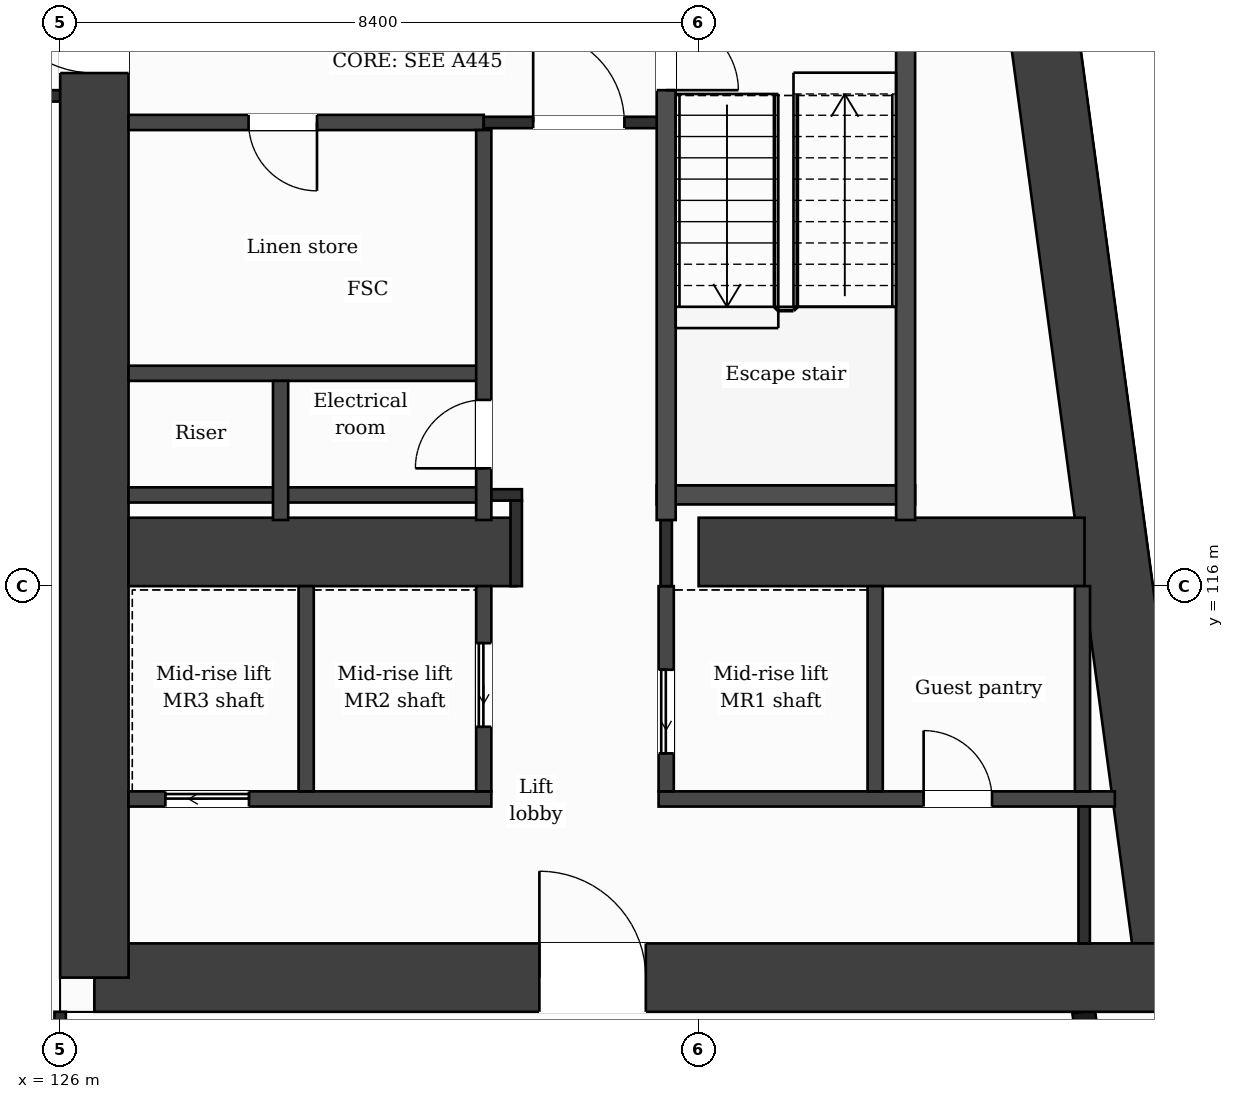
"""IFC4 building model, lengths in metres.
Left out: names, types, materials, properties, quantities, classifications, styles, units other than length and angle.
Written with IfcOpenShell. Run it as: python <this file> out.ifc"""

import sys

from ifc_helpers import new_model, si_unit, direction, frame, frame_2d, origin, place, context, subcontext, project, spatial, rectangle, extrude, element, fill, save


model = new_model("IFC4")
c1 = context("Model", 3, precision=1e-05, world=origin(), true_north=direction((0.0, 1.0)))
c2 = subcontext(c1, "Body", "Model", "MODEL_VIEW")
j1 = project(units=[si_unit("LENGTHUNIT", "METRE"), si_unit("PLANEANGLEUNIT", "RADIAN")], contexts=[c1])
p1 = place(None, origin())
s1 = spatial("IfcSite", under=j1, at=p1, CompositionType="ELEMENT")
p2 = place(p1, origin())
s2 = spatial("IfcBuilding", under=s1, at=p2, CompositionType="ELEMENT")
p3 = place(p2, frame((0.0, 0.0, 184.8)))
s3 = spatial("IfcBuildingStorey", under=s2, at=p3, CompositionType="ELEMENT", Elevation=184.8)
p4 = place(p3, frame((137.776, 131.95, 0.0), z_axis=(0.0, 0.0, 1.0), x_axis=(0.133421759112, -0.991059349482, 0.0)))
e1 = element("IfcWall", 1, at=p4, inside=s3, PredefinedType="SHEAR", context=c2, shape_type="SweptSolid", body=[
    extrude(rectangle(XDim=21.29, YDim=0.9, at=frame_2d((10.645, 0.0))), origin(), (0.0, 0.0, 1.0), 3.7),
])
p5 = place(p3, frame((140.616, 110.85, 0.0), z_axis=(0.0, 0.0, 1.0), x_axis=(-1.0, 0.0, 0.0)))
e2 = element("IfcWall", 2, at=p5, inside=s3, PredefinedType="SHEAR", context=c2, shape_type="SweptSolid", body=[
    extrude(rectangle(XDim=14.166, YDim=0.9, at=frame_2d((7.083, 0.0))), origin(), (0.0, 0.0, 1.0), 3.7),
])
p6 = place(p5, frame((6.911, 0.0, 0.0)))
e3 = element("IfcOpeningElement", 3, at=p6, cuts=e2, PredefinedType="OPENING", context=c2, shape_type="SweptSolid", body=[
    extrude(rectangle(XDim=1.4, YDim=2.1, at=frame_2d((0.7, 1.05))), frame((0.0, 0.46, 0.0), z_axis=(0.0, -1.0, 0.0), x_axis=(1.0, 0.0, 0.0)), (0.0, 0.0, 1.0), 0.92),
])
p7 = place(p3, frame((126.45, 110.85, 0.0), z_axis=(0.0, 0.0, 1.0), x_axis=(0.0, 1.0, 0.0)))
e4 = element("IfcWall", 4, at=p7, inside=s3, PredefinedType="SHEAR", context=c2, shape_type="SweptSolid", body=[
    extrude(rectangle(XDim=21.1, YDim=0.9, at=frame_2d((10.55, 0.0))), origin(), (0.0, 0.0, 1.0), 3.7),
])
p8 = place(p7, frame((11.9, 0.0, 0.0)))
e5 = element("IfcOpeningElement", 5, at=p8, cuts=e4, PredefinedType="OPENING", context=c2, shape_type="SweptSolid", body=[
    extrude(rectangle(XDim=1.4, YDim=2.1, at=frame_2d((0.7, 1.05))), frame((0.0, 0.46, 0.0), z_axis=(0.0, -1.0, 0.0), x_axis=(1.0, 0.0, 0.0)), (0.0, 0.0, 1.0), 0.92),
])
p9 = place(p3, frame((126.9, 116.45, 0.0), z_axis=(0.0, 0.0, 1.0), x_axis=(1.0, 0.0, 0.0)))
e6 = element("IfcWall", 6, at=p9, inside=s3, PredefinedType="SHEAR", context=c2, shape_type="SweptSolid", body=[
    extrude(rectangle(XDim=5.1, YDim=0.9, at=frame_2d((2.55, 0.0))), origin(), (0.0, 0.0, 1.0), 3.7),
])
p10 = place(p3, frame((134.4, 116.45, 0.0), z_axis=(0.0, 0.0, 1.0), x_axis=(1.0, 0.0, 0.0)))
e7 = element("IfcWall", 7, at=p10, inside=s3, PredefinedType="SHEAR", context=c2, shape_type="SweptSolid", body=[
    extrude(rectangle(XDim=5.077, YDim=0.9, at=frame_2d((2.539, 0.0))), origin(), (0.0, 0.0, 1.0), 3.7),
])
p11 = place(p3, frame((140.348, 103.85, 0.0), z_axis=(0.0, 0.0, 1.0), x_axis=(-0.133431549479, 0.991058031401, 0.0)))
e8 = element("IfcWall", 8, at=p11, inside=s3, PredefinedType="SOLIDWALL", context=c2, shape_type="SweptSolid", body=[
    extrude(rectangle(XDim=6.609, YDim=0.3, at=frame_2d((3.304, 0.0))), origin(), (0.0, 0.0, 1.0), 3.38),
])
p12 = place(p11, frame((0.737, 0.0, 0.9)))
e9 = element("IfcOpeningElement", 9, at=p12, cuts=e8, PredefinedType="OPENING", context=c2, shape_type="SweptSolid", body=[
    extrude(rectangle(XDim=1.2, YDim=2.1, at=frame_2d((0.6, 1.05))), frame((0.0, 0.16, 0.0), z_axis=(0.0, -1.0, 0.0), x_axis=(1.0, 0.0, 0.0)), (0.0, 0.0, 1.0), 0.32),
])
p13 = place(p11, frame((3.991, 0.0, 0.0)))
e10 = element("IfcOpeningElement", 10, at=p13, cuts=e8, PredefinedType="OPENING", context=c2, shape_type="SweptSolid", body=[
    extrude(rectangle(XDim=1.2, YDim=2.4, at=frame_2d((0.6, 1.2))), frame((0.0, 0.16, 0.0), z_axis=(0.0, -1.0, 0.0), x_axis=(1.0, 0.0, 0.0)), (0.0, 0.0, 1.0), 0.32),
])
p14 = place(p3, frame((126.9, 113.2, 0.0), z_axis=(0.0, 0.0, 1.0), x_axis=(1.0, 0.0, 0.0)))
e11 = element("IfcWall", 11, at=p14, inside=s3, PredefinedType="PARTITIONING", context=c2, shape_type="SweptSolid", body=[
    extrude(rectangle(XDim=4.773, YDim=0.2, at=frame_2d((2.387, 0.0))), origin(), (0.0, 0.0, 1.0), 3.38),
])
p15 = place(p14, frame((0.484, 0.0, 0.0)))
e12 = element("IfcOpeningElement", 12, at=p15, cuts=e11, PredefinedType="OPENING", context=c2, shape_type="SweptSolid", body=[
    extrude(rectangle(XDim=1.1, YDim=2.1, at=frame_2d((0.55, 1.05))), frame((0.0, 0.11, 0.0), z_axis=(0.0, -1.0, 0.0), x_axis=(1.0, 0.0, 0.0)), (0.0, 0.0, 1.0), 0.22),
])
p16 = place(p3, frame((133.873, 113.2, 0.0), z_axis=(0.0, 0.0, 1.0), x_axis=(1.0, 0.0, 0.0)))
e13 = element("IfcWall", 13, at=p16, inside=s3, PredefinedType="PARTITIONING", context=c2, shape_type="SweptSolid", body=[
    extrude(rectangle(XDim=6.003, YDim=0.2, at=frame_2d((3.001, 0.0))), origin(), (0.0, 0.0, 1.0), 3.38),
])
p17 = place(p16, frame((3.487, 0.0, 0.0)))
e14 = element("IfcOpeningElement", 14, at=p17, cuts=e13, PredefinedType="OPENING", context=c2, shape_type="SweptSolid", body=[
    extrude(rectangle(XDim=0.9, YDim=2.1, at=frame_2d((0.45, 1.05))), frame((0.0, 0.11, 0.0), z_axis=(0.0, -1.0, 0.0), x_axis=(1.0, 0.0, 0.0)), (0.0, 0.0, 1.0), 0.22),
])
p18 = place(p3, frame((126.9, 117.2, 0.0), z_axis=(0.0, 0.0, 1.0), x_axis=(1.0, 0.0, 0.0)))
e15 = element("IfcWall", 15, at=p18, inside=s3, PredefinedType="PARTITIONING", context=c2, shape_type="SweptSolid", body=[
    extrude(rectangle(XDim=4.673, YDim=0.2, at=frame_2d((2.336, 0.0))), origin(), (0.0, 0.0, 1.0), 3.38),
])
p19 = place(p3, frame((131.573, 117.2, 0.0), z_axis=(0.0, 0.0, 1.0), x_axis=(1.0, 0.0, 0.0)))
e16 = element("IfcWall", 16, at=p19, inside=s3, PredefinedType="PARTITIONING", context=c2, shape_type="SweptSolid", body=[
    extrude(rectangle(XDim=0.502, YDim=0.15, at=frame_2d((0.251, 0.0))), origin(), (0.0, 0.0, 1.0), 3.38),
])
p20 = place(p3, frame((133.848, 117.2, 0.0), z_axis=(0.0, 0.0, 1.0), x_axis=(1.0, 0.0, 0.0)))
e17 = element("IfcWall", 17, at=p20, inside=s3, PredefinedType="PARTITIONING", context=c2, shape_type="SweptSolid", body=[
    extrude(rectangle(XDim=3.4, YDim=0.25, at=frame_2d((1.7, 0.0))), origin(), (0.0, 0.0, 1.0), 3.38),
])
p21 = place(p3, frame((126.9, 118.8, 0.0), z_axis=(0.0, 0.0, 1.0), x_axis=(1.0, 0.0, 0.0)))
e18 = element("IfcWall", 18, at=p21, inside=s3, PredefinedType="PARTITIONING", context=c2, shape_type="SweptSolid", body=[
    extrude(rectangle(XDim=4.673, YDim=0.2, at=frame_2d((2.336, 0.0))), origin(), (0.0, 0.0, 1.0), 3.38),
])
p22 = place(p3, frame((126.9, 122.1, 0.0), z_axis=(0.0, 0.0, 1.0), x_axis=(1.0, 0.0, 0.0)))
e19 = element("IfcWall", 19, at=p22, inside=s3, PredefinedType="PARTITIONING", context=c2, shape_type="SweptSolid", body=[
    extrude(rectangle(XDim=4.673, YDim=0.2, at=frame_2d((2.336, 0.0))), origin(), (0.0, 0.0, 1.0), 3.38),
])
p23 = place(p22, frame((1.579, 0.0, 0.0)))
e20 = element("IfcOpeningElement", 20, at=p23, cuts=e19, PredefinedType="OPENING", context=c2, shape_type="SweptSolid", body=[
    extrude(rectangle(XDim=0.9, YDim=2.1, at=frame_2d((0.45, 1.05))), frame((0.0, 0.11, 0.0), z_axis=(0.0, -1.0, 0.0), x_axis=(1.0, 0.0, 0.0)), (0.0, 0.0, 1.0), 0.22),
])
p24 = place(p3, frame((131.573, 122.1, 0.0), z_axis=(0.0, 0.0, 1.0), x_axis=(1.0, 0.0, 0.0)))
e21 = element("IfcWall", 21, at=p24, inside=s3, PredefinedType="PARTITIONING", context=c2, shape_type="SweptSolid", body=[
    extrude(rectangle(XDim=2.4, YDim=0.15, at=frame_2d((1.2, 0.0))), origin(), (0.0, 0.0, 1.0), 3.38),
])
p25 = place(p24, frame((0.65, 0.0, 0.0)))
e22 = element("IfcOpeningElement", 22, at=p25, cuts=e21, PredefinedType="OPENING", context=c2, shape_type="SweptSolid", body=[
    extrude(rectangle(XDim=1.2, YDim=2.1, at=frame_2d((0.6, 1.05))), frame((0.0, 0.085, 0.0), z_axis=(0.0, -1.0, 0.0), x_axis=(1.0, 0.0, 0.0)), (0.0, 0.0, 1.0), 0.17),
])
p26 = place(p3, frame((100.8, 122.45, 0.0), z_axis=(0.0, 0.0, 1.0), x_axis=(1.0, 0.0, 0.0)))
e23 = element("IfcWall", 23, at=p26, inside=s3, PredefinedType="PARTITIONING", context=c2, shape_type="SweptSolid", body=[
    extrude(rectangle(XDim=25.2, YDim=0.15, at=frame_2d((12.6, 0.0))), origin(), (0.0, 0.0, 1.0), 3.38),
])
p27 = place(p3, frame((126.0, 109.075, 0.0), z_axis=(0.0, 0.0, 1.0), x_axis=(0.0, 1.0, 0.0)))
e24 = element("IfcWall", 24, at=p27, inside=s3, PredefinedType="PARTITIONING", context=c2, shape_type="SweptSolid", body=[
    extrude(rectangle(XDim=1.325, YDim=0.15, at=frame_2d((0.663, 0.0))), origin(), (0.0, 0.0, 1.0), 3.38),
])
p28 = place(p3, frame((128.9, 116.87, 0.0), z_axis=(0.0, 0.0, 1.0), x_axis=(0.0, 1.0, 0.0)))
e25 = element("IfcWall", 25, at=p28, inside=s3, PredefinedType="PARTITIONING", context=c2, shape_type="SweptSolid", body=[
    extrude(rectangle(XDim=1.83, YDim=0.2, at=frame_2d((0.915, 0.0))), origin(), (0.0, 0.0, 1.0), 3.38),
])
p29 = place(p3, frame((129.237, 113.3, 0.0), z_axis=(0.0, 0.0, 1.0), x_axis=(0.0, 1.0, 0.0)))
e26 = element("IfcWall", 26, at=p29, inside=s3, PredefinedType="PARTITIONING", context=c2, shape_type="SweptSolid", body=[
    extrude(rectangle(XDim=2.7, YDim=0.2, at=frame_2d((1.35, 0.0))), origin(), (0.0, 0.0, 1.0), 3.38),
])
p30 = place(p3, frame((131.573, 113.3, 0.0), z_axis=(0.0, 0.0, 1.0), x_axis=(0.0, 1.0, 0.0)))
e27 = element("IfcWall", 27, at=p30, inside=s3, PredefinedType="PARTITIONING", context=c2, shape_type="SweptSolid", body=[
    extrude(rectangle(XDim=2.7, YDim=0.2, at=frame_2d((1.35, 0.0))), origin(), (0.0, 0.0, 1.0), 3.38),
])
p31 = place(p30, frame((0.85, 0.0, 0.0)))
e28 = element("IfcOpeningElement", 28, at=p31, cuts=e27, PredefinedType="OPENING", context=c2, shape_type="SweptSolid", body=[
    extrude(rectangle(XDim=1.1, YDim=2.1, at=frame_2d((0.55, 1.05))), frame((0.0, 0.11, 0.0), z_axis=(0.0, -1.0, 0.0), x_axis=(1.0, 0.0, 0.0)), (0.0, 0.0, 1.0), 0.22),
])
p32 = place(p3, frame((131.573, 116.87, 0.0), z_axis=(0.0, 0.0, 1.0), x_axis=(0.0, 1.0, 0.0)))
e29 = element("IfcWall", 29, at=p32, inside=s3, PredefinedType="PARTITIONING", context=c2, shape_type="SweptSolid", body=[
    extrude(rectangle(XDim=5.13, YDim=0.2, at=frame_2d((2.565, 0.0))), origin(), (0.0, 0.0, 1.0), 3.38),
])
p33 = place(p32, frame((0.68, 0.0, 0.0)))
e30 = element("IfcOpeningElement", 30, at=p33, cuts=e29, PredefinedType="OPENING", context=c2, shape_type="SweptSolid", body=[
    extrude(rectangle(XDim=0.9, YDim=2.1, at=frame_2d((0.45, 1.05))), frame((0.0, 0.11, 0.0), z_axis=(0.0, -1.0, 0.0), x_axis=(1.0, 0.0, 0.0)), (0.0, 0.0, 1.0), 0.22),
])
p34 = place(p3, frame((132.0, 116.0, 0.0), z_axis=(0.0, 0.0, 1.0), x_axis=(0.0, 1.0, 0.0)))
e31 = element("IfcWall", 31, at=p34, inside=s3, PredefinedType="PARTITIONING", context=c2, shape_type="SweptSolid", body=[
    extrude(rectangle(XDim=1.125, YDim=0.15, at=frame_2d((0.562, 0.0))), origin(), (0.0, 0.0, 1.0), 3.38),
])
p35 = place(p3, frame((133.973, 113.3, 0.0), z_axis=(0.0, 0.0, 1.0), x_axis=(0.0, 1.0, 0.0)))
e32 = element("IfcWall", 32, at=p35, inside=s3, PredefinedType="PARTITIONING", context=c2, shape_type="SweptSolid", body=[
    extrude(rectangle(XDim=2.7, YDim=0.2, at=frame_2d((1.35, 0.0))), origin(), (0.0, 0.0, 1.0), 3.38),
])
p36 = place(p35, frame((0.5, 0.0, 0.0)))
e33 = element("IfcOpeningElement", 33, at=p36, cuts=e32, PredefinedType="OPENING", context=c2, shape_type="SweptSolid", body=[
    extrude(rectangle(XDim=1.1, YDim=2.1, at=frame_2d((0.55, 1.05))), frame((0.0, 0.11, 0.0), z_axis=(0.0, -1.0, 0.0), x_axis=(1.0, 0.0, 0.0)), (0.0, 0.0, 1.0), 0.22),
])
p37 = place(p3, frame((133.973, 116.0, 0.0), z_axis=(0.0, 0.0, 1.0), x_axis=(0.0, 1.0, 0.0)))
e34 = element("IfcWall", 34, at=p37, inside=s3, PredefinedType="PARTITIONING", context=c2, shape_type="SweptSolid", body=[
    extrude(rectangle(XDim=0.87, YDim=0.15, at=frame_2d((0.435, 0.0))), origin(), (0.0, 0.0, 1.0), 3.38),
])
p38 = place(p3, frame((133.973, 116.87, 0.0), z_axis=(0.0, 0.0, 1.0), x_axis=(0.0, 1.0, 0.0)))
e35 = element("IfcWall", 35, at=p38, inside=s3, PredefinedType="PARTITIONING", context=c2, shape_type="SweptSolid", body=[
    extrude(rectangle(XDim=6.955, YDim=0.25, at=frame_2d((3.478, 0.0))), origin(), (0.0, 0.0, 1.0), 3.38),
])
p39 = place(p38, frame((5.655, 0.0, 0.0)))
e36 = element("IfcOpeningElement", 36, at=p39, cuts=e35, PredefinedType="OPENING", context=c2, shape_type="SweptSolid", body=[
    extrude(rectangle(XDim=0.95, YDim=2.1, at=frame_2d((0.475, 1.05))), frame((0.0, 0.135, 0.0), z_axis=(0.0, -1.0, 0.0), x_axis=(1.0, 0.0, 0.0)), (0.0, 0.0, 1.0), 0.27),
])
p40 = place(p3, frame((136.722, 113.3, 0.0), z_axis=(0.0, 0.0, 1.0), x_axis=(0.0, 1.0, 0.0)))
e37 = element("IfcWall", 37, at=p40, inside=s3, PredefinedType="PARTITIONING", context=c2, shape_type="SweptSolid", body=[
    extrude(rectangle(XDim=2.7, YDim=0.2, at=frame_2d((1.35, 0.0))), origin(), (0.0, 0.0, 1.0), 3.38),
])
p41 = place(p3, frame((137.123, 116.87, 0.0), z_axis=(0.0, 0.0, 1.0), x_axis=(0.0, 1.0, 0.0)))
e38 = element("IfcWall", 38, at=p41, inside=s3, PredefinedType="PARTITIONING", context=c2, shape_type="SweptSolid", body=[
    extrude(rectangle(XDim=6.955, YDim=0.25, at=frame_2d((3.478, 0.0))), origin(), (0.0, 0.0, 1.0), 3.38),
])
p42 = place(p3, frame((139.45, 113.3, 0.0), z_axis=(0.0, 0.0, 1.0), x_axis=(0.0, 1.0, 0.0)))
e39 = element("IfcWall", 39, at=p42, inside=s3, PredefinedType="PARTITIONING", context=c2, shape_type="SweptSolid", body=[
    extrude(rectangle(XDim=2.7, YDim=0.2, at=frame_2d((1.35, 0.0))), origin(), (0.0, 0.0, 1.0), 3.38),
])
p43 = place(p3, frame((139.472, 111.3, 0.0), z_axis=(0.0, 0.0, 1.0), x_axis=(0.0, 1.0, 0.0)))
e40 = element("IfcWall", 40, at=p43, inside=s3, PredefinedType="PARTITIONING", context=c2, shape_type="SweptSolid", body=[
    extrude(rectangle(XDim=1.8, YDim=0.15, at=frame_2d((0.9, 0.0))), origin(), (0.0, 0.0, 1.0), 3.38),
])
p44 = place(p25, origin())
e41 = element("IfcDoor", 41, at=p44, inside=s3, OperationType="SINGLE_SWING_LEFT", PredefinedType="DOOR", context=c2, shape_type="SweptSolid", body=[
    extrude(rectangle(XDim=1.2, YDim=2.1, at=frame_2d((0.6, 1.05))), frame((0.0, 0.025, 0.0), z_axis=(0.0, -1.0, 0.0), x_axis=(1.0, 0.0, 0.0)), (0.0, 0.0, 1.0), 0.05),
])
fill(e22, e41)
p45 = place(p23, origin())
e42 = element("IfcDoor", 42, at=p45, inside=s3, OperationType="SINGLE_SWING_RIGHT", PredefinedType="DOOR", context=c2, shape_type="SweptSolid", body=[
    extrude(rectangle(XDim=0.9, YDim=2.1, at=frame_2d((0.45, 1.05))), frame((0.0, 0.025, 0.0), z_axis=(0.0, -1.0, 0.0), x_axis=(1.0, 0.0, 0.0)), (0.0, 0.0, 1.0), 0.05),
])
fill(e20, e42)
p46 = place(p39, origin())
e43 = element("IfcDoor", 43, at=p46, inside=s3, OperationType="SINGLE_SWING_LEFT", PredefinedType="DOOR", context=c2, shape_type="SweptSolid", body=[
    extrude(rectangle(XDim=0.95, YDim=2.1, at=frame_2d((0.475, 1.05))), frame((0.0, 0.025, 0.0), z_axis=(0.0, -1.0, 0.0), x_axis=(1.0, 0.0, 0.0)), (0.0, 0.0, 1.0), 0.05),
])
fill(e36, e43)
p47 = place(p33, origin())
e44 = element("IfcDoor", 44, at=p47, inside=s3, OperationType="SINGLE_SWING_LEFT", PredefinedType="DOOR", context=c2, shape_type="SweptSolid", body=[
    extrude(rectangle(XDim=0.9, YDim=2.1, at=frame_2d((0.45, 1.05))), frame((0.0, 0.025, 0.0), z_axis=(0.0, -1.0, 0.0), x_axis=(1.0, 0.0, 0.0)), (0.0, 0.0, 1.0), 0.05),
])
fill(e30, e44)
p48 = place(p36, origin())
e45 = element("IfcDoor", 45, at=p48, inside=s3, OperationType="SLIDING_TO_LEFT", PredefinedType="DOOR", context=c2, shape_type="SweptSolid", body=[
    extrude(rectangle(XDim=1.1, YDim=2.1, at=frame_2d((0.55, 1.05))), frame((0.0, 0.025, 0.0), z_axis=(0.0, -1.0, 0.0), x_axis=(1.0, 0.0, 0.0)), (0.0, 0.0, 1.0), 0.05),
])
fill(e33, e45)
p49 = place(p31, origin())
e46 = element("IfcDoor", 46, at=p49, inside=s3, OperationType="SLIDING_TO_LEFT", PredefinedType="DOOR", context=c2, shape_type="SweptSolid", body=[
    extrude(rectangle(XDim=1.1, YDim=2.1, at=frame_2d((0.55, 1.05))), frame((0.0, 0.025, 0.0), z_axis=(0.0, -1.0, 0.0), x_axis=(1.0, 0.0, 0.0)), (0.0, 0.0, 1.0), 0.05),
])
fill(e28, e46)
p50 = place(p15, origin())
e47 = element("IfcDoor", 47, at=p50, inside=s3, OperationType="SLIDING_TO_LEFT", PredefinedType="DOOR", context=c2, shape_type="SweptSolid", body=[
    extrude(rectangle(XDim=1.1, YDim=2.1, at=frame_2d((0.55, 1.05))), frame((0.0, 0.025, 0.0), z_axis=(0.0, -1.0, 0.0), x_axis=(1.0, 0.0, 0.0)), (0.0, 0.0, 1.0), 0.05),
])
fill(e12, e47)
p51 = place(p17, origin())
e48 = element("IfcDoor", 48, at=p51, inside=s3, OperationType="SINGLE_SWING_LEFT", PredefinedType="DOOR", context=c2, shape_type="SweptSolid", body=[
    extrude(rectangle(XDim=0.9, YDim=2.1, at=frame_2d((0.45, 1.05))), frame((0.0, 0.025, 0.0), z_axis=(0.0, -1.0, 0.0), x_axis=(1.0, 0.0, 0.0)), (0.0, 0.0, 1.0), 0.05),
])
fill(e14, e48)
p52 = place(p6, origin())
e49 = element("IfcDoor", 49, at=p52, inside=s3, OperationType="SINGLE_SWING_RIGHT", PredefinedType="DOOR", context=c2, shape_type="SweptSolid", body=[
    extrude(rectangle(XDim=1.4, YDim=2.1, at=frame_2d((0.7, 1.05))), frame((0.0, 0.025, 0.0), z_axis=(0.0, -1.0, 0.0), x_axis=(1.0, 0.0, 0.0)), (0.0, 0.0, 1.0), 0.05),
])
fill(e3, e49)
p53 = place(p8, origin())
e50 = element("IfcDoor", 50, at=p53, inside=s3, OperationType="SINGLE_SWING_RIGHT", PredefinedType="DOOR", context=c2, shape_type="SweptSolid", body=[
    extrude(rectangle(XDim=1.4, YDim=2.1, at=frame_2d((0.7, 1.05))), frame((0.0, 0.025, 0.0), z_axis=(0.0, -1.0, 0.0), x_axis=(1.0, 0.0, 0.0)), (0.0, 0.0, 1.0), 0.05),
])
fill(e5, e50)
save(model, sys.argv[1])
